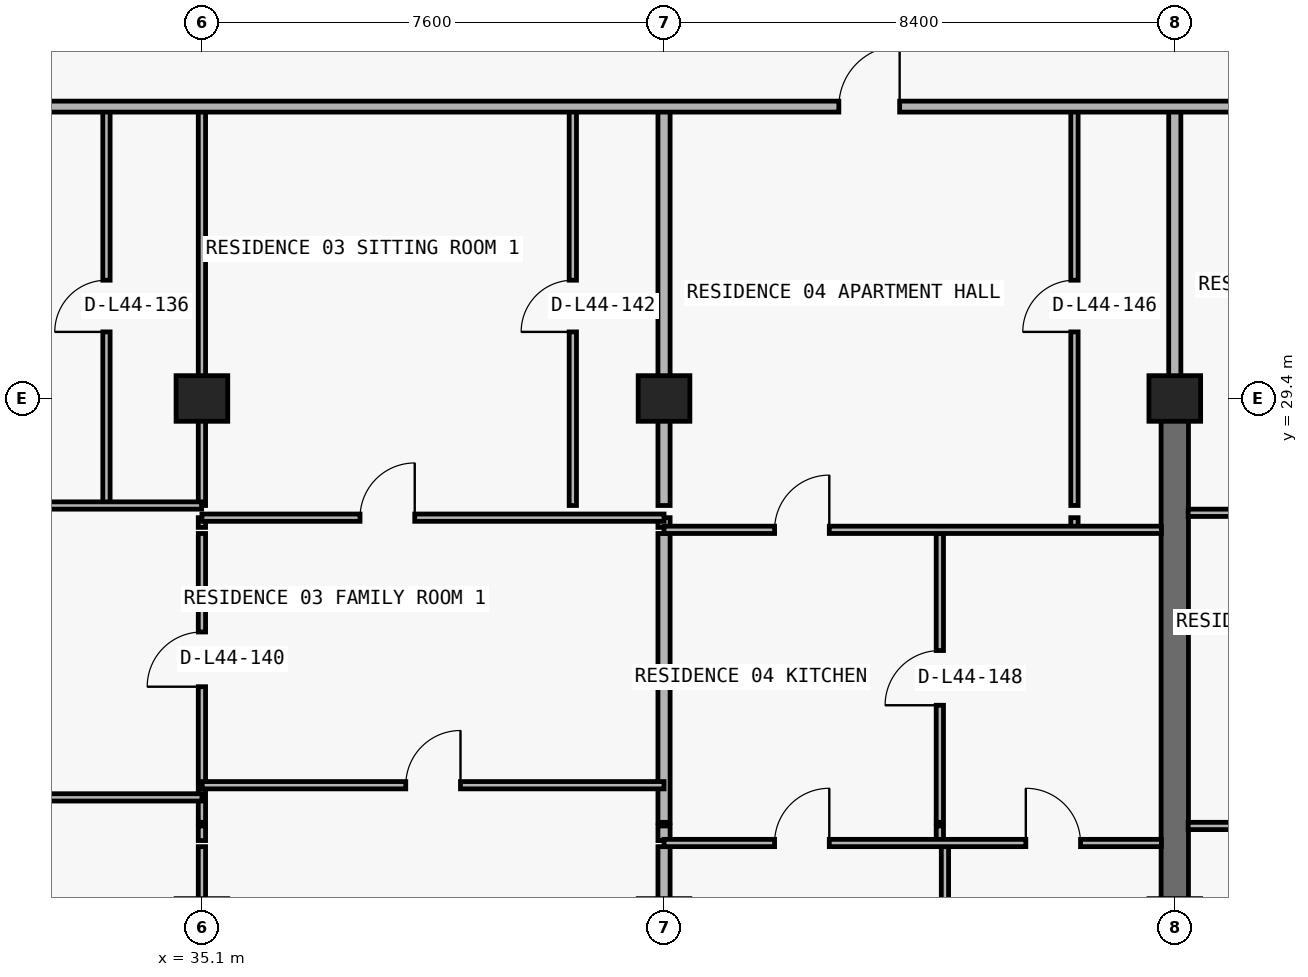
"""IFC4 building model, lengths in metres.
Left out: names, types, materials, properties, quantities, classifications, styles, units other than length and angle.
Written with IfcOpenShell. Run it as: python <this file> out.ifc"""

import sys

from ifc_helpers import new_model, si_unit, direction, frame, frame_2d, origin, origin_2d, place, context, subcontext, project, spatial, rectangle, extrude, element, fill, save


model = new_model("IFC4")
c1 = context("Model", 3, precision=1e-05, world=origin(), true_north=direction((0.0, 1.0)))
c2 = subcontext(c1, "Body", "Model", "MODEL_VIEW")
j1 = project(units=[si_unit("LENGTHUNIT", "METRE"), si_unit("PLANEANGLEUNIT", "RADIAN")], contexts=[c1])
p1 = place(None, origin())
s1 = spatial("IfcSite", under=j1, at=p1, CompositionType="ELEMENT")
p2 = place(p1, origin())
s2 = spatial("IfcBuilding", under=s1, at=p2, CompositionType="ELEMENT")
p3 = place(p2, frame((0.0, 0.0, 160.5)))
s3 = spatial("IfcBuildingStorey", under=s2, at=p3, CompositionType="ELEMENT", Elevation=160.5)
for number, where, z_axis, x_axis in (
    (1, (35.1, 29.4, 0.0), (0.0, 0.0, 1.0), (1.0, 0.0, 0.0)),
    (2, (42.7, 29.4, 0.0), (0.0, 0.0, 1.0), (1.0, 0.0, 0.0)),
    (3, (51.1, 29.4, 0.0), (0.0, 0.0, 1.0), (1.0, 0.0, 0.0)),
):
    element("IfcColumn", number, at=place(p3, frame(where, z_axis=z_axis, x_axis=x_axis)), inside=s3, PredefinedType="COLUMN", context=c2, shape_type="SweptSolid", body=[
        extrude(rectangle(XDim=0.85, YDim=0.75, at=origin_2d()), origin(), (0.0, 0.0, 1.0), 3.05),
    ])
p4 = place(p3, frame((51.1, 20.8, 0.0), z_axis=(0.0, 0.0, 1.0), x_axis=(0.0, 1.0, 0.0)))
e4 = element("IfcWall", 4, at=p4, inside=s3, PredefinedType="SHEAR", context=c2, shape_type="SweptSolid", body=[
    extrude(rectangle(XDim=8.6, YDim=0.45, at=frame_2d((4.3, 0.0))), origin(), (0.0, 0.0, 1.0), 3.05),
])
p5 = place(p3, frame((33.53, 27.64, 0.0), z_axis=(0.0, 0.0, 1.0), x_axis=(0.0, 1.0, 0.0)))
e5 = element("IfcWall", 5, at=p5, inside=s3, PredefinedType="PARTITIONING", context=c2, shape_type="SweptSolid", body=[
    extrude(rectangle(XDim=6.56, YDim=0.12, at=frame_2d((3.28, 0.0))), origin(), (0.0, 0.0, 1.0), 3.05),
])
p6 = place(p5, frame((2.855, 0.0, 0.0)))
e6 = element("IfcOpeningElement", 6, at=p6, cuts=e5, PredefinedType="OPENING", context=c2, shape_type="SweptSolid", body=[
    extrude(rectangle(XDim=0.85, YDim=2.1, at=frame_2d((0.425, 1.05))), frame((0.0, 0.07, 0.0), z_axis=(0.0, -1.0, 0.0), x_axis=(1.0, 0.0, 0.0)), (0.0, 0.0, 1.0), 0.14),
])
p7 = place(p3, frame((35.1, 11.24, 0.0), z_axis=(0.0, 0.0, 1.0), x_axis=(0.0, 1.0, 0.0)))
e7 = element("IfcWall", 7, at=p7, inside=s3, PredefinedType="PARTITIONING", context=c2, shape_type="SweptSolid", body=[
    extrude(rectangle(XDim=10.79, YDim=0.12, at=frame_2d((5.395, 0.0))), origin(), (0.0, 0.0, 1.0), 2.263),
])
p8 = place(p3, frame((35.1, 22.13, 0.0), z_axis=(0.0, 0.0, 1.0), x_axis=(0.0, 1.0, 0.0)))
e8 = element("IfcWall", 8, at=p8, inside=s3, PredefinedType="PARTITIONING", context=c2, shape_type="SweptSolid", body=[
    extrude(rectangle(XDim=0.24, YDim=0.12, at=frame_2d((0.12, 0.0))), origin(), (0.0, 0.0, 1.0), 2.263),
])
p9 = place(p3, frame((35.1, 22.43, 0.0), z_axis=(0.0, 0.0, 1.0), x_axis=(0.0, 1.0, 0.0)))
e9 = element("IfcWall", 9, at=p9, inside=s3, PredefinedType="PARTITIONING", context=c2, shape_type="SweptSolid", body=[
    extrude(rectangle(XDim=4.75, YDim=0.12, at=frame_2d((2.375, 0.0))), origin(), (0.0, 0.0, 1.0), 2.263),
])
p10 = place(p9, frame((2.23, 0.0, 0.0)))
e10 = element("IfcOpeningElement", 10, at=p10, cuts=e9, PredefinedType="OPENING", context=c2, shape_type="SweptSolid", body=[
    extrude(rectangle(XDim=0.9, YDim=2.15, at=frame_2d((0.45, 1.075))), frame((0.0, 0.07, 0.0), z_axis=(0.0, -1.0, 0.0), x_axis=(1.0, 0.0, 0.0)), (0.0, 0.0, 1.0), 0.14),
])
p11 = place(p3, frame((35.1, 27.28, 0.0), z_axis=(0.0, 0.0, 1.0), x_axis=(0.0, 1.0, 0.0)))
e11 = element("IfcWall", 11, at=p11, inside=s3, PredefinedType="PARTITIONING", context=c2, shape_type="SweptSolid", body=[
    extrude(rectangle(XDim=0.16, YDim=0.12, at=frame_2d((0.08, 0.0))), origin(), (0.0, 0.0, 1.0), 2.263),
])
p12 = place(p3, frame((35.1, 27.64, 0.0), z_axis=(0.0, 0.0, 1.0), x_axis=(0.0, 1.0, 0.0)))
e12 = element("IfcWall", 12, at=p12, inside=s3, PredefinedType="PARTITIONING", context=c2, shape_type="SweptSolid", body=[
    extrude(rectangle(XDim=6.56, YDim=0.12, at=frame_2d((3.28, 0.0))), origin(), (0.0, 0.0, 1.0), 2.263),
])
p13 = place(p3, frame((41.2, 27.64, 0.0), z_axis=(0.0, 0.0, 1.0), x_axis=(0.0, 1.0, 0.0)))
e13 = element("IfcWall", 13, at=p13, inside=s3, PredefinedType="PARTITIONING", context=c2, shape_type="SweptSolid", body=[
    extrude(rectangle(XDim=6.56, YDim=0.12, at=frame_2d((3.28, 0.0))), origin(), (0.0, 0.0, 1.0), 3.05),
])
p14 = place(p13, frame((2.855, 0.0, 0.0)))
e14 = element("IfcOpeningElement", 14, at=p14, cuts=e13, PredefinedType="OPENING", context=c2, shape_type="SweptSolid", body=[
    extrude(rectangle(XDim=0.85, YDim=2.1, at=frame_2d((0.425, 1.05))), frame((0.0, 0.07, 0.0), z_axis=(0.0, -1.0, 0.0), x_axis=(1.0, 0.0, 0.0)), (0.0, 0.0, 1.0), 0.14),
])
p15 = place(p3, frame((42.7, 11.24, 0.0), z_axis=(0.0, 0.0, 1.0), x_axis=(0.0, 1.0, 0.0)))
e15 = element("IfcWall", 15, at=p15, inside=s3, PredefinedType="PARTITIONING", context=c2, shape_type="SweptSolid", body=[
    extrude(rectangle(XDim=10.79, YDim=0.2, at=frame_2d((5.395, 0.0))), origin(), (0.0, 0.0, 1.0), 2.263),
])
p16 = place(p3, frame((42.7, 22.13, 0.0), z_axis=(0.0, 0.0, 1.0), x_axis=(0.0, 1.0, 0.0)))
e16 = element("IfcWall", 16, at=p16, inside=s3, PredefinedType="PARTITIONING", context=c2, shape_type="SweptSolid", body=[
    extrude(rectangle(XDim=0.24, YDim=0.2, at=frame_2d((0.12, 0.0))), origin(), (0.0, 0.0, 1.0), 2.263),
])
p17 = place(p3, frame((42.7, 22.43, 0.0), z_axis=(0.0, 0.0, 1.0), x_axis=(0.0, 1.0, 0.0)))
e17 = element("IfcWall", 17, at=p17, inside=s3, PredefinedType="PARTITIONING", context=c2, shape_type="SweptSolid", body=[
    extrude(rectangle(XDim=4.75, YDim=0.2, at=frame_2d((2.375, 0.0))), origin(), (0.0, 0.0, 1.0), 2.263),
])
p18 = place(p3, frame((42.7, 27.28, 0.0), z_axis=(0.0, 0.0, 1.0), x_axis=(0.0, 1.0, 0.0)))
e18 = element("IfcWall", 18, at=p18, inside=s3, PredefinedType="PARTITIONING", context=c2, shape_type="SweptSolid", body=[
    extrude(rectangle(XDim=0.16, YDim=0.2, at=frame_2d((0.08, 0.0))), origin(), (0.0, 0.0, 1.0), 2.263),
])
p19 = place(p3, frame((42.7, 27.64, 0.0), z_axis=(0.0, 0.0, 1.0), x_axis=(0.0, 1.0, 0.0)))
e19 = element("IfcWall", 19, at=p19, inside=s3, PredefinedType="PARTITIONING", context=c2, shape_type="SweptSolid", body=[
    extrude(rectangle(XDim=6.56, YDim=0.2, at=frame_2d((3.28, 0.0))), origin(), (0.0, 0.0, 1.0), 2.263),
])
p20 = place(p3, frame((47.236, 22.13, 0.0), z_axis=(0.0, 0.0, 1.0), x_axis=(0.0, 1.0, 0.0)))
e20 = element("IfcWall", 20, at=p20, inside=s3, PredefinedType="PARTITIONING", context=c2, shape_type="SweptSolid", body=[
    extrude(rectangle(XDim=0.24, YDim=0.12, at=frame_2d((0.12, 0.0))), origin(), (0.0, 0.0, 1.0), 3.05),
])
p21 = place(p3, frame((47.236, 22.43, 0.0), z_axis=(0.0, 0.0, 1.0), x_axis=(0.0, 1.0, 0.0)))
e21 = element("IfcWall", 21, at=p21, inside=s3, PredefinedType="PARTITIONING", context=c2, shape_type="SweptSolid", body=[
    extrude(rectangle(XDim=4.75, YDim=0.12, at=frame_2d((2.375, 0.0))), origin(), (0.0, 0.0, 1.0), 3.05),
])
p22 = place(p21, frame((1.925, 0.0, 0.0)))
e22 = element("IfcOpeningElement", 22, at=p22, cuts=e21, PredefinedType="OPENING", context=c2, shape_type="SweptSolid", body=[
    extrude(rectangle(XDim=0.9, YDim=2.15, at=frame_2d((0.45, 1.075))), frame((0.0, 0.07, 0.0), z_axis=(0.0, -1.0, 0.0), x_axis=(1.0, 0.0, 0.0)), (0.0, 0.0, 1.0), 0.14),
])
p23 = place(p3, frame((47.32, 11.24, 0.0), z_axis=(0.0, 0.0, 1.0), x_axis=(0.0, 1.0, 0.0)))
e23 = element("IfcWall", 23, at=p23, inside=s3, PredefinedType="PARTITIONING", context=c2, shape_type="SweptSolid", body=[
    extrude(rectangle(XDim=10.79, YDim=0.12, at=frame_2d((5.395, 0.0))), origin(), (0.0, 0.0, 1.0), 3.05),
])
p24 = place(p3, frame((49.45, 27.28, 0.0), z_axis=(0.0, 0.0, 1.0), x_axis=(0.0, 1.0, 0.0)))
e24 = element("IfcWall", 24, at=p24, inside=s3, PredefinedType="PARTITIONING", context=c2, shape_type="SweptSolid", body=[
    extrude(rectangle(XDim=0.16, YDim=0.12, at=frame_2d((0.08, 0.0))), origin(), (0.0, 0.0, 1.0), 3.05),
])
p25 = place(p3, frame((49.45, 27.64, 0.0), z_axis=(0.0, 0.0, 1.0), x_axis=(0.0, 1.0, 0.0)))
e25 = element("IfcWall", 25, at=p25, inside=s3, PredefinedType="PARTITIONING", context=c2, shape_type="SweptSolid", body=[
    extrude(rectangle(XDim=6.56, YDim=0.12, at=frame_2d((3.28, 0.0))), origin(), (0.0, 0.0, 1.0), 3.05),
])
p26 = place(p25, frame((2.855, 0.0, 0.0)))
e26 = element("IfcOpeningElement", 26, at=p26, cuts=e25, PredefinedType="OPENING", context=c2, shape_type="SweptSolid", body=[
    extrude(rectangle(XDim=0.85, YDim=2.1, at=frame_2d((0.425, 1.05))), frame((0.0, 0.07, 0.0), z_axis=(0.0, -1.0, 0.0), x_axis=(1.0, 0.0, 0.0)), (0.0, 0.0, 1.0), 0.14),
])
p27 = place(p3, frame((51.1, 29.405, 0.0), z_axis=(0.0, 0.0, 1.0), x_axis=(0.0, 1.0, 0.0)))
e27 = element("IfcWall", 27, at=p27, inside=s3, PredefinedType="PARTITIONING", context=c2, shape_type="SweptSolid", body=[
    extrude(rectangle(XDim=4.795, YDim=0.2, at=frame_2d((2.397, 0.0))), origin(), (0.0, 0.0, 1.0), 2.335),
])
p28 = place(p3, frame((42.7, 22.09, 0.0), z_axis=(0.0, 0.0, 1.0), x_axis=(1.0, 0.0, 0.0)))
e28 = element("IfcWall", 28, at=p28, inside=s3, PredefinedType="PARTITIONING", context=c2, shape_type="SweptSolid", body=[
    extrude(rectangle(XDim=8.18, YDim=0.12, at=frame_2d((4.09, 0.0))), origin(), (0.0, 0.0, 1.0), 3.05),
])
p29 = place(p28, frame((1.818, 0.0, 0.0)))
e29 = element("IfcOpeningElement", 29, at=p29, cuts=e28, PredefinedType="OPENING", context=c2, shape_type="SweptSolid", body=[
    extrude(rectangle(XDim=0.9, YDim=2.15, at=frame_2d((0.45, 1.075))), frame((0.0, 0.07, 0.0), z_axis=(0.0, -1.0, 0.0), x_axis=(1.0, 0.0, 0.0)), (0.0, 0.0, 1.0), 0.14),
])
p30 = place(p28, frame((5.95, 0.0, 0.0)))
e30 = element("IfcOpeningElement", 30, at=p30, cuts=e28, PredefinedType="OPENING", context=c2, shape_type="SweptSolid", body=[
    extrude(rectangle(XDim=0.9, YDim=2.15, at=frame_2d((0.45, 1.075))), frame((0.0, 0.07, 0.0), z_axis=(0.0, -1.0, 0.0), x_axis=(1.0, 0.0, 0.0)), (0.0, 0.0, 1.0), 0.14),
])
p31 = place(p3, frame((51.32, 22.37, 0.0), z_axis=(0.0, 0.0, 1.0), x_axis=(1.0, 0.0, 0.0)))
e31 = element("IfcWall", 31, at=p31, inside=s3, PredefinedType="PARTITIONING", context=c2, shape_type="SweptSolid", body=[
    extrude(rectangle(XDim=4.566, YDim=0.12, at=frame_2d((2.283, 0.0))), origin(), (0.0, 0.0, 1.0), 3.05),
])
p32 = place(p31, frame((1.414, 0.0, 0.0)))
e32 = element("IfcOpeningElement", 32, at=p32, cuts=e31, PredefinedType="OPENING", context=c2, shape_type="SweptSolid", body=[
    extrude(rectangle(XDim=0.9, YDim=2.15, at=frame_2d((0.45, 1.075))), frame((0.0, 0.07, 0.0), z_axis=(0.0, -1.0, 0.0), x_axis=(1.0, 0.0, 0.0)), (0.0, 0.0, 1.0), 0.14),
])
p33 = place(p3, frame((26.92, 22.84, 0.0), z_axis=(0.0, 0.0, 1.0), x_axis=(1.0, 0.0, 0.0)))
e33 = element("IfcWall", 33, at=p33, inside=s3, PredefinedType="PARTITIONING", context=c2, shape_type="SweptSolid", body=[
    extrude(rectangle(XDim=8.18, YDim=0.12, at=frame_2d((4.09, 0.0))), origin(), (0.0, 0.0, 1.0), 3.05),
])
p34 = place(p33, frame((1.33, 0.0, 0.0)))
e34 = element("IfcOpeningElement", 34, at=p34, cuts=e33, PredefinedType="OPENING", context=c2, shape_type="SweptSolid", body=[
    extrude(rectangle(XDim=0.9, YDim=2.15, at=frame_2d((0.45, 1.075))), frame((0.0, 0.07, 0.0), z_axis=(0.0, -1.0, 0.0), x_axis=(1.0, 0.0, 0.0)), (0.0, 0.0, 1.0), 0.14),
])
p35 = place(p3, frame((35.105, 23.04, 0.0), z_axis=(0.0, 0.0, 1.0), x_axis=(1.0, 0.0, 0.0)))
e35 = element("IfcWall", 35, at=p35, inside=s3, PredefinedType="PARTITIONING", context=c2, shape_type="SweptSolid", body=[
    extrude(rectangle(XDim=7.595, YDim=0.12, at=frame_2d((3.797, 0.0))), origin(), (0.0, 0.0, 1.0), 3.05),
])
p36 = place(p35, frame((3.347, 0.0, 0.0)))
e36 = element("IfcOpeningElement", 36, at=p36, cuts=e35, PredefinedType="OPENING", context=c2, shape_type="SweptSolid", body=[
    extrude(rectangle(XDim=0.9, YDim=2.15, at=frame_2d((0.45, 1.075))), frame((0.0, 0.07, 0.0), z_axis=(0.0, -1.0, 0.0), x_axis=(1.0, 0.0, 0.0)), (0.0, 0.0, 1.0), 0.14),
])
p37 = place(p3, frame((42.7, 27.24, 0.0), z_axis=(0.0, 0.0, 1.0), x_axis=(1.0, 0.0, 0.0)))
e37 = element("IfcWall", 37, at=p37, inside=s3, PredefinedType="PARTITIONING", context=c2, shape_type="SweptSolid", body=[
    extrude(rectangle(XDim=8.18, YDim=0.12, at=frame_2d((4.09, 0.0))), origin(), (0.0, 0.0, 1.0), 3.05),
])
p38 = place(p37, frame((1.818, 0.0, 0.0)))
e38 = element("IfcOpeningElement", 38, at=p38, cuts=e37, PredefinedType="OPENING", context=c2, shape_type="SweptSolid", body=[
    extrude(rectangle(XDim=0.9, YDim=2.15, at=frame_2d((0.45, 1.075))), frame((0.0, 0.07, 0.0), z_axis=(0.0, -1.0, 0.0), x_axis=(1.0, 0.0, 0.0)), (0.0, 0.0, 1.0), 0.14),
])
p39 = place(p3, frame((35.1, 27.44, 0.0), z_axis=(0.0, 0.0, 1.0), x_axis=(1.0, 0.0, 0.0)))
e39 = element("IfcWall", 39, at=p39, inside=s3, PredefinedType="PARTITIONING", context=c2, shape_type="SweptSolid", body=[
    extrude(rectangle(XDim=7.6, YDim=0.12, at=frame_2d((3.8, 0.0))), origin(), (0.0, 0.0, 1.0), 3.05),
])
p40 = place(p39, frame((2.6, 0.0, 0.0)))
e40 = element("IfcOpeningElement", 40, at=p40, cuts=e39, PredefinedType="OPENING", context=c2, shape_type="SweptSolid", body=[
    extrude(rectangle(XDim=0.9, YDim=2.15, at=frame_2d((0.45, 1.075))), frame((0.0, 0.07, 0.0), z_axis=(0.0, -1.0, 0.0), x_axis=(1.0, 0.0, 0.0)), (0.0, 0.0, 1.0), 0.14),
])
p41 = place(p3, frame((51.32, 27.52, 0.0), z_axis=(0.0, 0.0, 1.0), x_axis=(1.0, 0.0, 0.0)))
e41 = element("IfcWall", 41, at=p41, inside=s3, PredefinedType="PARTITIONING", context=c2, shape_type="SweptSolid", body=[
    extrude(rectangle(XDim=4.566, YDim=0.12, at=frame_2d((2.283, 0.0))), origin(), (0.0, 0.0, 1.0), 3.05),
])
p42 = place(p41, frame((1.833, 0.0, 0.0)))
e42 = element("IfcOpeningElement", 42, at=p42, cuts=e41, PredefinedType="OPENING", context=c2, shape_type="SweptSolid", body=[
    extrude(rectangle(XDim=0.9, YDim=2.15, at=frame_2d((0.45, 1.075))), frame((0.0, 0.07, 0.0), z_axis=(0.0, -1.0, 0.0), x_axis=(1.0, 0.0, 0.0)), (0.0, 0.0, 1.0), 0.14),
])
p43 = place(p3, frame((26.92, 27.64, 0.0), z_axis=(0.0, 0.0, 1.0), x_axis=(1.0, 0.0, 0.0)))
e43 = element("IfcWall", 43, at=p43, inside=s3, PredefinedType="PARTITIONING", context=c2, shape_type="SweptSolid", body=[
    extrude(rectangle(XDim=8.175, YDim=0.12, at=frame_2d((4.087, 0.0))), origin(), (0.0, 0.0, 1.0), 3.05),
])
p44 = place(p43, frame((1.33, 0.0, 0.0)))
e44 = element("IfcOpeningElement", 44, at=p44, cuts=e43, PredefinedType="OPENING", context=c2, shape_type="SweptSolid", body=[
    extrude(rectangle(XDim=0.9, YDim=2.15, at=frame_2d((0.45, 1.075))), frame((0.0, 0.07, 0.0), z_axis=(0.0, -1.0, 0.0), x_axis=(1.0, 0.0, 0.0)), (0.0, 0.0, 1.0), 0.14),
])
p45 = place(p3, frame((18.3, 34.2, 0.0), z_axis=(0.0, 0.0, 1.0), x_axis=(1.0, 0.0, 0.0)))
e45 = element("IfcWall", 45, at=p45, inside=s3, PredefinedType="PARTITIONING", context=c2, shape_type="SweptSolid", body=[
    extrude(rectangle(XDim=37.586, YDim=0.18, at=frame_2d((18.793, 0.0))), origin(), (0.0, 0.0, 1.0), 3.05),
])
p46 = place(p45, frame((2.875, 0.0, 0.0)))
e46 = element("IfcOpeningElement", 46, at=p46, cuts=e45, PredefinedType="OPENING", context=c2, shape_type="SweptSolid", body=[
    extrude(rectangle(XDim=1.0, YDim=2.2, at=frame_2d((0.5, 1.1))), frame((0.0, 0.1, 0.0), z_axis=(0.0, -1.0, 0.0), x_axis=(1.0, 0.0, 0.0)), (0.0, 0.0, 1.0), 0.2),
])
p47 = place(p45, frame((11.315, 0.0, 0.0)))
e47 = element("IfcOpeningElement", 47, at=p47, cuts=e45, PredefinedType="OPENING", context=c2, shape_type="SweptSolid", body=[
    extrude(rectangle(XDim=1.0, YDim=2.2, at=frame_2d((0.5, 1.1))), frame((0.0, 0.1, 0.0), z_axis=(0.0, -1.0, 0.0), x_axis=(1.0, 0.0, 0.0)), (0.0, 0.0, 1.0), 0.2),
])
p48 = place(p45, frame((27.275, 0.0, 0.0)))
e48 = element("IfcOpeningElement", 48, at=p48, cuts=e45, PredefinedType="OPENING", context=c2, shape_type="SweptSolid", body=[
    extrude(rectangle(XDim=1.0, YDim=2.2, at=frame_2d((0.5, 1.1))), frame((0.0, 0.1, 0.0), z_axis=(0.0, -1.0, 0.0), x_axis=(1.0, 0.0, 0.0)), (0.0, 0.0, 1.0), 0.2),
])
p49 = place(p45, frame((34.693, 0.0, 0.0)))
e49 = element("IfcOpeningElement", 49, at=p49, cuts=e45, PredefinedType="OPENING", context=c2, shape_type="SweptSolid", body=[
    extrude(rectangle(XDim=1.0, YDim=2.2, at=frame_2d((0.5, 1.1))), frame((0.0, 0.1, 0.0), z_axis=(0.0, -1.0, 0.0), x_axis=(1.0, 0.0, 0.0)), (0.0, 0.0, 1.0), 0.2),
])
p50 = place(p6, origin())
e50 = element("IfcDoor", 50, at=p50, inside=s3, OperationType="SINGLE_SWING_LEFT", PredefinedType="DOOR", context=c2, shape_type="SweptSolid", body=[
    extrude(rectangle(XDim=0.85, YDim=2.1, at=frame_2d((0.425, 1.05))), frame((0.0, 0.025, 0.0), z_axis=(0.0, -1.0, 0.0), x_axis=(1.0, 0.0, 0.0)), (0.0, 0.0, 1.0), 0.05),
])
fill(e6, e50)
p51 = place(p10, origin())
e51 = element("IfcDoor", 51, at=p51, inside=s3, OperationType="SINGLE_SWING_LEFT", PredefinedType="DOOR", context=c2, shape_type="SweptSolid", body=[
    extrude(rectangle(XDim=0.9, YDim=2.15, at=frame_2d((0.45, 1.075))), frame((0.0, 0.025, 0.0), z_axis=(0.0, -1.0, 0.0), x_axis=(1.0, 0.0, 0.0)), (0.0, 0.0, 1.0), 0.05),
])
fill(e10, e51)
p52 = place(p40, origin())
e52 = element("IfcDoor", 52, at=p52, inside=s3, OperationType="SINGLE_SWING_RIGHT", PredefinedType="DOOR", context=c2, shape_type="SweptSolid", body=[
    extrude(rectangle(XDim=0.9, YDim=2.15, at=frame_2d((0.45, 1.075))), frame((0.0, 0.025, 0.0), z_axis=(0.0, -1.0, 0.0), x_axis=(1.0, 0.0, 0.0)), (0.0, 0.0, 1.0), 0.05),
])
fill(e40, e52)
p53 = place(p14, origin())
e53 = element("IfcDoor", 53, at=p53, inside=s3, OperationType="SINGLE_SWING_LEFT", PredefinedType="DOOR", context=c2, shape_type="SweptSolid", body=[
    extrude(rectangle(XDim=0.85, YDim=2.1, at=frame_2d((0.425, 1.05))), frame((0.0, 0.025, 0.0), z_axis=(0.0, -1.0, 0.0), x_axis=(1.0, 0.0, 0.0)), (0.0, 0.0, 1.0), 0.05),
])
fill(e14, e53)
p54 = place(p36, origin())
e54 = element("IfcDoor", 54, at=p54, inside=s3, OperationType="SINGLE_SWING_RIGHT", PredefinedType="DOOR", context=c2, shape_type="SweptSolid", body=[
    extrude(rectangle(XDim=0.9, YDim=2.15, at=frame_2d((0.45, 1.075))), frame((0.0, 0.025, 0.0), z_axis=(0.0, -1.0, 0.0), x_axis=(1.0, 0.0, 0.0)), (0.0, 0.0, 1.0), 0.05),
])
fill(e36, e54)
p55 = place(p48, origin())
e55 = element("IfcDoor", 55, at=p55, inside=s3, OperationType="SINGLE_SWING_RIGHT", PredefinedType="DOOR", context=c2, shape_type="SweptSolid", body=[
    extrude(rectangle(XDim=1.0, YDim=2.2, at=frame_2d((0.5, 1.1))), frame((0.0, 0.025, 0.0), z_axis=(0.0, -1.0, 0.0), x_axis=(1.0, 0.0, 0.0)), (0.0, 0.0, 1.0), 0.05),
])
fill(e48, e55)
p56 = place(p26, origin())
e56 = element("IfcDoor", 56, at=p56, inside=s3, OperationType="SINGLE_SWING_LEFT", PredefinedType="DOOR", context=c2, shape_type="SweptSolid", body=[
    extrude(rectangle(XDim=0.85, YDim=2.1, at=frame_2d((0.425, 1.05))), frame((0.0, 0.025, 0.0), z_axis=(0.0, -1.0, 0.0), x_axis=(1.0, 0.0, 0.0)), (0.0, 0.0, 1.0), 0.05),
])
fill(e26, e56)
p57 = place(p38, origin())
e57 = element("IfcDoor", 57, at=p57, inside=s3, OperationType="SINGLE_SWING_RIGHT", PredefinedType="DOOR", context=c2, shape_type="SweptSolid", body=[
    extrude(rectangle(XDim=0.9, YDim=2.15, at=frame_2d((0.45, 1.075))), frame((0.0, 0.025, 0.0), z_axis=(0.0, -1.0, 0.0), x_axis=(1.0, 0.0, 0.0)), (0.0, 0.0, 1.0), 0.05),
])
fill(e38, e57)
p58 = place(p22, origin())
e58 = element("IfcDoor", 58, at=p58, inside=s3, OperationType="SINGLE_SWING_LEFT", PredefinedType="DOOR", context=c2, shape_type="SweptSolid", body=[
    extrude(rectangle(XDim=0.9, YDim=2.15, at=frame_2d((0.45, 1.075))), frame((0.0, 0.025, 0.0), z_axis=(0.0, -1.0, 0.0), x_axis=(1.0, 0.0, 0.0)), (0.0, 0.0, 1.0), 0.05),
])
fill(e22, e58)
p59 = place(p29, origin())
e59 = element("IfcDoor", 59, at=p59, inside=s3, OperationType="SINGLE_SWING_RIGHT", PredefinedType="DOOR", context=c2, shape_type="SweptSolid", body=[
    extrude(rectangle(XDim=0.9, YDim=2.15, at=frame_2d((0.45, 1.075))), frame((0.0, 0.025, 0.0), z_axis=(0.0, -1.0, 0.0), x_axis=(1.0, 0.0, 0.0)), (0.0, 0.0, 1.0), 0.05),
])
fill(e29, e59)
p60 = place(p30, origin())
e60 = element("IfcDoor", 60, at=p60, inside=s3, OperationType="SINGLE_SWING_LEFT", PredefinedType="DOOR", context=c2, shape_type="SweptSolid", body=[
    extrude(rectangle(XDim=0.9, YDim=2.15, at=frame_2d((0.45, 1.075))), frame((0.0, 0.025, 0.0), z_axis=(0.0, -1.0, 0.0), x_axis=(1.0, 0.0, 0.0)), (0.0, 0.0, 1.0), 0.05),
])
fill(e30, e60)
save(model, sys.argv[1])
